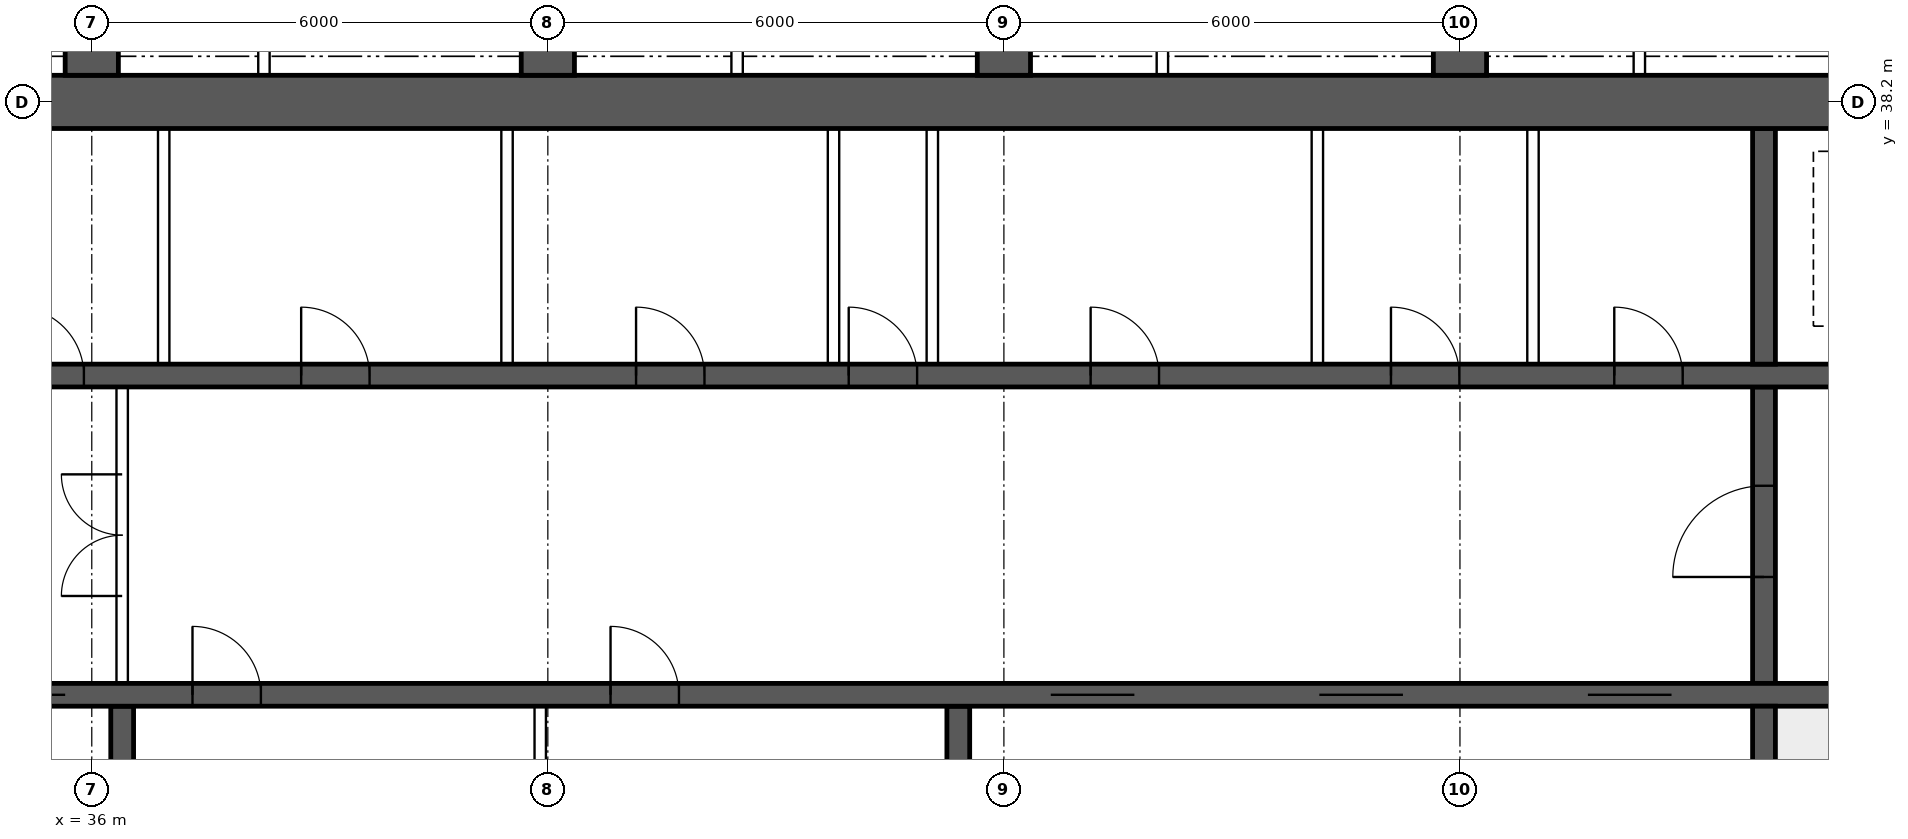
"""IFC4 building model, lengths in metres.
Left out: names, types, materials, properties, quantities, classifications, styles, units other than length and angle.
Written with IfcOpenShell. Run it as: python <this file> out.ifc"""

import sys

from ifc_helpers import new_model, si_unit, direction, frame, frame_2d, origin, place, context, subcontext, project, spatial, rectangle, extrude, element, fill, save


model = new_model("IFC4")
c1 = context("Model", 3, precision=1e-05, world=origin(), true_north=direction((0.0, 1.0)))
c2 = subcontext(c1, "Body", "Model", "MODEL_VIEW")
j1 = project(units=[si_unit("LENGTHUNIT", "METRE"), si_unit("PLANEANGLEUNIT", "RADIAN")], contexts=[c1])
p1 = place(None, origin())
s1 = spatial("IfcSite", under=j1, at=p1, CompositionType="ELEMENT")
p2 = place(p1, origin())
s2 = spatial("IfcBuilding", under=s1, at=p2, CompositionType="ELEMENT")
p3 = place(p2, frame((0.0, 0.0, 239.05)))
s3 = spatial("IfcBuildingStorey", under=s2, at=p3, CompositionType="ELEMENT", Elevation=239.05)
p4 = place(p3, frame((18.0, 38.2, 0.0), z_axis=(0.0, 0.0, 1.0), x_axis=(1.0, 0.0, 0.0)))
e1 = element("IfcWall", 1, at=p4, inside=s3, PredefinedType="SHEAR", context=c2, shape_type="SweptSolid", body=[
    extrude(rectangle(XDim=48.0, YDim=0.7, at=frame_2d((24.0, 0.0))), origin(), (0.0, 0.0, 1.0), 3.75),
])
p5 = place(p3, frame((18.35, 30.4, 0.0), z_axis=(0.0, 0.0, 1.0), x_axis=(1.0, 0.0, 0.0)))
e2 = element("IfcWall", 2, at=p5, inside=s3, PredefinedType="SHEAR", context=c2, shape_type="SweptSolid", body=[
    extrude(rectangle(XDim=47.3, YDim=0.3, at=frame_2d((23.65, 0.0))), origin(), (0.0, 0.0, 1.0), 3.75),
])
p6 = place(p5, frame((0.4, 0.0, 0.0)))
e3 = element("IfcOpeningElement", 3, at=p6, cuts=e2, PredefinedType="OPENING", context=c2, shape_type="SweptSolid", body=[
    extrude(rectangle(XDim=1.0, YDim=2.1, at=frame_2d((0.5, 1.05))), frame((0.0, 0.16, 0.0), z_axis=(0.0, -1.0, 0.0), x_axis=(1.0, 0.0, 0.0)), (0.0, 0.0, 1.0), 0.32),
])
p7 = place(p5, frame((45.9, 0.0, 0.0)))
e4 = element("IfcOpeningElement", 4, at=p7, cuts=e2, PredefinedType="OPENING", context=c2, shape_type="SweptSolid", body=[
    extrude(rectangle(XDim=1.0, YDim=2.1, at=frame_2d((0.5, 1.05))), frame((0.0, 0.16, 0.0), z_axis=(0.0, -1.0, 0.0), x_axis=(1.0, 0.0, 0.0)), (0.0, 0.0, 1.0), 0.32),
])
p8 = place(p5, frame((8.4, 0.0, 0.0)))
e5 = element("IfcOpeningElement", 5, at=p8, cuts=e2, PredefinedType="OPENING", context=c2, shape_type="SweptSolid", body=[
    extrude(rectangle(XDim=1.1, YDim=2.1, at=frame_2d((0.55, 1.05))), frame((0.0, 0.16, 0.0), z_axis=(0.0, -1.0, 0.0), x_axis=(1.0, 0.0, 0.0)), (0.0, 0.0, 1.0), 0.32),
])
p9 = place(p5, frame((11.0, 0.0, 0.0)))
e6 = element("IfcOpeningElement", 6, at=p9, cuts=e2, PredefinedType="OPENING", context=c2, shape_type="SweptSolid", body=[
    extrude(rectangle(XDim=1.1, YDim=2.1, at=frame_2d((0.55, 1.05))), frame((0.0, 0.16, 0.0), z_axis=(0.0, -1.0, 0.0), x_axis=(1.0, 0.0, 0.0)), (0.0, 0.0, 1.0), 0.32),
])
p10 = place(p5, frame((13.6, 0.0, 0.0)))
e7 = element("IfcOpeningElement", 7, at=p10, cuts=e2, PredefinedType="OPENING", context=c2, shape_type="SweptSolid", body=[
    extrude(rectangle(XDim=1.1, YDim=2.1, at=frame_2d((0.55, 1.05))), frame((0.0, 0.16, 0.0), z_axis=(0.0, -1.0, 0.0), x_axis=(1.0, 0.0, 0.0)), (0.0, 0.0, 1.0), 0.32),
])
p11 = place(p5, frame((16.2, 0.0, 0.0)))
e8 = element("IfcOpeningElement", 8, at=p11, cuts=e2, PredefinedType="OPENING", context=c2, shape_type="SweptSolid", body=[
    extrude(rectangle(XDim=1.1, YDim=2.1, at=frame_2d((0.55, 1.05))), frame((0.0, 0.16, 0.0), z_axis=(0.0, -1.0, 0.0), x_axis=(1.0, 0.0, 0.0)), (0.0, 0.0, 1.0), 0.32),
])
p12 = place(p5, frame((18.975, 0.0, 0.0)))
e9 = element("IfcOpeningElement", 9, at=p12, cuts=e2, PredefinedType="OPENING", context=c2, shape_type="SweptSolid", body=[
    extrude(rectangle(XDim=0.9, YDim=2.1, at=frame_2d((0.45, 1.05))), frame((0.0, 0.16, 0.0), z_axis=(0.0, -1.0, 0.0), x_axis=(1.0, 0.0, 0.0)), (0.0, 0.0, 1.0), 0.32),
])
p13 = place(p5, frame((24.475, 0.0, 0.0)))
e10 = element("IfcOpeningElement", 10, at=p13, cuts=e2, PredefinedType="OPENING", context=c2, shape_type="SweptSolid", body=[
    extrude(rectangle(XDim=0.9, YDim=2.1, at=frame_2d((0.45, 1.05))), frame((0.0, 0.16, 0.0), z_axis=(0.0, -1.0, 0.0), x_axis=(1.0, 0.0, 0.0)), (0.0, 0.0, 1.0), 0.32),
])
p14 = place(p5, frame((30.267, 0.0, 0.0)))
e11 = element("IfcOpeningElement", 11, at=p14, cuts=e2, PredefinedType="OPENING", context=c2, shape_type="SweptSolid", body=[
    extrude(rectangle(XDim=1.1, YDim=2.1, at=frame_2d((0.55, 1.05))), frame((0.0, 0.16, 0.0), z_axis=(0.0, -1.0, 0.0), x_axis=(1.0, 0.0, 0.0)), (0.0, 0.0, 1.0), 0.32),
])
p15 = place(p5, frame((33.8, 0.0, 0.0)))
e12 = element("IfcOpeningElement", 12, at=p15, cuts=e2, PredefinedType="OPENING", context=c2, shape_type="SweptSolid", body=[
    extrude(rectangle(XDim=1.1, YDim=2.1, at=frame_2d((0.55, 1.05))), frame((0.0, 0.16, 0.0), z_axis=(0.0, -1.0, 0.0), x_axis=(1.0, 0.0, 0.0)), (0.0, 0.0, 1.0), 0.32),
])
p16 = place(p5, frame((37.333, 0.0, 0.0)))
e13 = element("IfcOpeningElement", 13, at=p16, cuts=e2, PredefinedType="OPENING", context=c2, shape_type="SweptSolid", body=[
    extrude(rectangle(XDim=1.1, YDim=2.1, at=frame_2d((0.55, 1.05))), frame((0.0, 0.16, 0.0), z_axis=(0.0, -1.0, 0.0), x_axis=(1.0, 0.0, 0.0)), (0.0, 0.0, 1.0), 0.32),
])
p17 = place(p3, frame((18.35, 34.6, 0.0), z_axis=(0.0, 0.0, 1.0), x_axis=(1.0, 0.0, 0.0)))
e14 = element("IfcWall", 14, at=p17, inside=s3, PredefinedType="SHEAR", context=c2, shape_type="SweptSolid", body=[
    extrude(rectangle(XDim=47.3, YDim=0.3, at=frame_2d((23.65, 0.0))), origin(), (0.0, 0.0, 1.0), 3.75),
])
p18 = place(p17, frame((0.9, 0.0, 0.0)))
e15 = element("IfcOpeningElement", 15, at=p18, cuts=e14, PredefinedType="OPENING", context=c2, shape_type="SweptSolid", body=[
    extrude(rectangle(XDim=1.1, YDim=2.1, at=frame_2d((0.55, 1.05))), frame((0.0, 0.16, 0.0), z_axis=(0.0, -1.0, 0.0), x_axis=(1.0, 0.0, 0.0)), (0.0, 0.0, 1.0), 0.32),
])
p19 = place(p17, frame((45.3, 0.0, 0.0)))
e16 = element("IfcOpeningElement", 16, at=p19, cuts=e14, PredefinedType="OPENING", context=c2, shape_type="SweptSolid", body=[
    extrude(rectangle(XDim=1.1, YDim=2.1, at=frame_2d((0.55, 1.05))), frame((0.0, 0.16, 0.0), z_axis=(0.0, -1.0, 0.0), x_axis=(1.0, 0.0, 0.0)), (0.0, 0.0, 1.0), 0.32),
])
p20 = place(p17, frame((4.25, 0.0, 0.0)))
e17 = element("IfcOpeningElement", 17, at=p20, cuts=e14, PredefinedType="OPENING", context=c2, shape_type="SweptSolid", body=[
    extrude(rectangle(XDim=0.9, YDim=2.1, at=frame_2d((0.45, 1.05))), frame((0.0, 0.16, 0.0), z_axis=(0.0, -1.0, 0.0), x_axis=(1.0, 0.0, 0.0)), (0.0, 0.0, 1.0), 0.32),
])
p21 = place(p17, frame((42.15, 0.0, 0.0)))
e18 = element("IfcOpeningElement", 18, at=p21, cuts=e14, PredefinedType="OPENING", context=c2, shape_type="SweptSolid", body=[
    extrude(rectangle(XDim=0.9, YDim=2.1, at=frame_2d((0.45, 1.05))), frame((0.0, 0.16, 0.0), z_axis=(0.0, -1.0, 0.0), x_axis=(1.0, 0.0, 0.0)), (0.0, 0.0, 1.0), 0.32),
])
p22 = place(p17, frame((9.025, 0.0, 0.0)))
e19 = element("IfcOpeningElement", 19, at=p22, cuts=e14, PredefinedType="OPENING", context=c2, shape_type="SweptSolid", body=[
    extrude(rectangle(XDim=0.9, YDim=2.1, at=frame_2d((0.45, 1.05))), frame((0.0, 0.16, 0.0), z_axis=(0.0, -1.0, 0.0), x_axis=(1.0, 0.0, 0.0)), (0.0, 0.0, 1.0), 0.32),
])
p23 = place(p17, frame((12.999, 0.0, 0.0)))
e20 = element("IfcOpeningElement", 20, at=p23, cuts=e14, PredefinedType="OPENING", context=c2, shape_type="SweptSolid", body=[
    extrude(rectangle(XDim=0.9, YDim=2.1, at=frame_2d((0.45, 1.05))), frame((0.0, 0.16, 0.0), z_axis=(0.0, -1.0, 0.0), x_axis=(1.0, 0.0, 0.0)), (0.0, 0.0, 1.0), 0.32),
])
p24 = place(p17, frame((16.646, 0.0, 0.0)))
e21 = element("IfcOpeningElement", 21, at=p24, cuts=e14, PredefinedType="OPENING", context=c2, shape_type="SweptSolid", body=[
    extrude(rectangle(XDim=0.9, YDim=2.1, at=frame_2d((0.45, 1.05))), frame((0.0, 0.16, 0.0), z_axis=(0.0, -1.0, 0.0), x_axis=(1.0, 0.0, 0.0)), (0.0, 0.0, 1.0), 0.32),
])
p25 = place(p17, frame((20.405, 0.0, 0.0)))
e22 = element("IfcOpeningElement", 22, at=p25, cuts=e14, PredefinedType="OPENING", context=c2, shape_type="SweptSolid", body=[
    extrude(rectangle(XDim=0.9, YDim=2.1, at=frame_2d((0.45, 1.05))), frame((0.0, 0.16, 0.0), z_axis=(0.0, -1.0, 0.0), x_axis=(1.0, 0.0, 0.0)), (0.0, 0.0, 1.0), 0.32),
])
p26 = place(p17, frame((24.811, 0.0, 0.0)))
e23 = element("IfcOpeningElement", 23, at=p26, cuts=e14, PredefinedType="OPENING", context=c2, shape_type="SweptSolid", body=[
    extrude(rectangle(XDim=0.9, YDim=2.1, at=frame_2d((0.45, 1.05))), frame((0.0, 0.16, 0.0), z_axis=(0.0, -1.0, 0.0), x_axis=(1.0, 0.0, 0.0)), (0.0, 0.0, 1.0), 0.32),
])
p27 = place(p17, frame((27.608, 0.0, 0.0)))
e24 = element("IfcOpeningElement", 24, at=p27, cuts=e14, PredefinedType="OPENING", context=c2, shape_type="SweptSolid", body=[
    extrude(rectangle(XDim=0.9, YDim=2.1, at=frame_2d((0.45, 1.05))), frame((0.0, 0.16, 0.0), z_axis=(0.0, -1.0, 0.0), x_axis=(1.0, 0.0, 0.0)), (0.0, 0.0, 1.0), 0.32),
])
p28 = place(p17, frame((30.791, 0.0, 0.0)))
e25 = element("IfcOpeningElement", 25, at=p28, cuts=e14, PredefinedType="OPENING", context=c2, shape_type="SweptSolid", body=[
    extrude(rectangle(XDim=0.9, YDim=2.1, at=frame_2d((0.45, 1.05))), frame((0.0, 0.16, 0.0), z_axis=(0.0, -1.0, 0.0), x_axis=(1.0, 0.0, 0.0)), (0.0, 0.0, 1.0), 0.32),
])
p29 = place(p17, frame((34.742, 0.0, 0.0)))
e26 = element("IfcOpeningElement", 26, at=p29, cuts=e14, PredefinedType="OPENING", context=c2, shape_type="SweptSolid", body=[
    extrude(rectangle(XDim=0.9, YDim=2.1, at=frame_2d((0.45, 1.05))), frame((0.0, 0.16, 0.0), z_axis=(0.0, -1.0, 0.0), x_axis=(1.0, 0.0, 0.0)), (0.0, 0.0, 1.0), 0.32),
])
p30 = place(p17, frame((37.68, 0.0, 0.0)))
e27 = element("IfcOpeningElement", 27, at=p30, cuts=e14, PredefinedType="OPENING", context=c2, shape_type="SweptSolid", body=[
    extrude(rectangle(XDim=0.9, YDim=2.1, at=frame_2d((0.45, 1.05))), frame((0.0, 0.16, 0.0), z_axis=(0.0, -1.0, 0.0), x_axis=(1.0, 0.0, 0.0)), (0.0, 0.0, 1.0), 0.32),
])
p31 = place(p3, frame((58.0, 26.15, 0.0), z_axis=(0.0, 0.0, 1.0), x_axis=(0.0, 1.0, 0.0)))
e28 = element("IfcWall", 28, at=p31, inside=s3, PredefinedType="SHEAR", context=c2, shape_type="SweptSolid", body=[
    extrude(rectangle(XDim=4.1, YDim=0.3, at=frame_2d((2.05, 0.0))), origin(), (0.0, 0.0, 1.0), 3.75),
])
p32 = place(p3, frame((58.0, 30.55, 0.0), z_axis=(0.0, 0.0, 1.0), x_axis=(0.0, 1.0, 0.0)))
e29 = element("IfcWall", 29, at=p32, inside=s3, PredefinedType="SHEAR", context=c2, shape_type="SweptSolid", body=[
    extrude(rectangle(XDim=3.9, YDim=0.3, at=frame_2d((1.95, 0.0))), origin(), (0.0, 0.0, 1.0), 3.75),
])
p33 = place(p32, frame((1.4, 0.0, 0.0)))
e30 = element("IfcOpeningElement", 30, at=p33, cuts=e29, PredefinedType="OPENING", context=c2, shape_type="SweptSolid", body=[
    extrude(rectangle(XDim=1.2, YDim=2.1, at=frame_2d((0.6, 1.05))), frame((0.0, 0.16, 0.0), z_axis=(0.0, -1.0, 0.0), x_axis=(1.0, 0.0, 0.0)), (0.0, 0.0, 1.0), 0.32),
])
p34 = place(p3, frame((58.0, 34.75, 0.0), z_axis=(0.0, 0.0, 1.0), x_axis=(0.0, 1.0, 0.0)))
e31 = element("IfcWall", 31, at=p34, inside=s3, PredefinedType="SHEAR", context=c2, shape_type="SweptSolid", body=[
    extrude(rectangle(XDim=3.1, YDim=0.3, at=frame_2d((1.55, 0.0))), origin(), (0.0, 0.0, 1.0), 3.75),
])
for number, where, z_axis, x_axis in (
    (32, (36.4, 26.15, 0.0), (0.0, 0.0, 1.0), (0.0, 1.0, 0.0)),
    (33, (47.4, 26.15, 0.0), (0.0, 0.0, 1.0), (0.0, 1.0, 0.0)),
):
    element("IfcWall", number, at=place(p3, frame(where, z_axis=z_axis, x_axis=x_axis)), inside=s3, PredefinedType="SHEAR", context=c2, shape_type="SweptSolid", body=[
        extrude(rectangle(XDim=4.1, YDim=0.3, at=frame_2d((2.05, 0.0))), origin(), (0.0, 0.0, 1.0), 3.75),
    ])
for number, where, z_axis, x_axis in (
    (34, (36.0, 38.55, 0.0), (0.0, 0.0, 1.0), (0.0, 1.0, 0.0)),
    (35, (42.0, 38.55, 0.0), (0.0, 0.0, 1.0), (0.0, 1.0, 0.0)),
    (36, (48.0, 38.55, 0.0), (0.0, 0.0, 1.0), (0.0, 1.0, 0.0)),
    (37, (54.0, 38.55, 0.0), (0.0, 0.0, 1.0), (0.0, 1.0, 0.0)),
):
    element("IfcWall", number, at=place(p3, frame(where, z_axis=z_axis, x_axis=x_axis)), inside=s3, PredefinedType="SHEAR", context=c2, shape_type="SweptSolid", body=[
        extrude(rectangle(XDim=7.05, YDim=0.7, at=frame_2d((3.525, 0.0))), origin(), (0.0, 0.0, 1.0), 3.75),
    ])
p35 = place(p3, frame((36.4, 30.55, 0.0), z_axis=(0.0, 0.0, 1.0), x_axis=(0.0, 1.0, 0.0)))
e38 = element("IfcWall", 38, at=p35, inside=s3, PredefinedType="SOLIDWALL", context=c2, shape_type="SweptSolid", body=[
    extrude(rectangle(XDim=3.9, YDim=0.15, at=frame_2d((1.95, 0.0))), origin(), (0.0, 0.0, 1.0), 3.5),
])
p36 = place(p35, frame((1.15, 0.0, 0.0)))
e39 = element("IfcOpeningElement", 39, at=p36, cuts=e38, PredefinedType="OPENING", context=c2, shape_type="SweptSolid", body=[
    extrude(rectangle(XDim=1.6, YDim=2.1, at=frame_2d((0.8, 1.05))), frame((0.0, 0.085, 0.0), z_axis=(0.0, -1.0, 0.0), x_axis=(1.0, 0.0, 0.0)), (0.0, 0.0, 1.0), 0.17),
])
for number, where, z_axis, x_axis in (
    (40, (36.946, 34.75, 0.0), (0.0, 0.0, 1.0), (0.0, 1.0, 0.0)),
    (41, (41.463, 34.75, 0.0), (0.0, 0.0, 1.0), (0.0, 1.0, 0.0)),
    (42, (45.758, 34.75, 0.0), (0.0, 0.0, 1.0), (0.0, 1.0, 0.0)),
    (43, (47.058, 34.75, 0.0), (0.0, 0.0, 1.0), (0.0, 1.0, 0.0)),
    (44, (52.124, 34.75, 0.0), (0.0, 0.0, 1.0), (0.0, 1.0, 0.0)),
    (45, (54.961, 34.75, 0.0), (0.0, 0.0, 1.0), (0.0, 1.0, 0.0)),
):
    element("IfcWall", number, at=place(p3, frame(where, z_axis=z_axis, x_axis=x_axis)), inside=s3, PredefinedType="SOLIDWALL", context=c2, shape_type="SweptSolid", body=[
        extrude(rectangle(XDim=3.1, YDim=0.15, at=frame_2d((1.55, 0.0))), origin(), (0.0, 0.0, 1.0), 3.5),
    ])
p37 = place(p3, frame((41.9, 26.15, 0.0), z_axis=(0.0, 0.0, 1.0), x_axis=(0.0, 1.0, 0.0)))
e46 = element("IfcWall", 46, at=p37, inside=s3, PredefinedType="SOLIDWALL", context=c2, shape_type="SweptSolid", body=[
    extrude(rectangle(XDim=4.1, YDim=0.15, at=frame_2d((2.05, 0.0))), origin(), (0.0, 0.0, 1.0), 3.5),
])
for number, where, z_axis, x_axis in (
    (47, (38.265, 38.55, 0.0), (0.0, 0.0, 1.0), (0.0, 1.0, 0.0)),
    (48, (44.49, 38.55, 0.0), (0.0, 0.0, 1.0), (0.0, 1.0, 0.0)),
    (49, (50.085, 38.55, 0.0), (0.0, 0.0, 1.0), (0.0, 1.0, 0.0)),
    (50, (56.36, 38.55, 0.0), (0.0, 0.0, 1.0), (0.0, 1.0, 0.0)),
):
    element("IfcWall", number, at=place(p3, frame(where, z_axis=z_axis, x_axis=x_axis)), inside=s3, PredefinedType="PARTITIONING", context=c2, shape_type="SweptSolid", body=[
        extrude(rectangle(XDim=6.95, YDim=0.15, at=frame_2d((3.475, 0.0))), origin(), (0.0, 0.0, 1.0), 3.5),
    ])
p38 = place(p36, origin())
e51 = element("IfcDoor", 51, at=p38, inside=s3, OperationType="DOUBLE_DOOR_SINGLE_SWING", PredefinedType="DOOR", context=c2, shape_type="SweptSolid", body=[
    extrude(rectangle(XDim=1.6, YDim=2.1, at=frame_2d((0.8, 1.05))), frame((0.0, 0.025, 0.0), z_axis=(0.0, -1.0, 0.0), x_axis=(1.0, 0.0, 0.0)), (0.0, 0.0, 1.0), 0.05),
])
fill(e39, e51)
p39 = place(p33, origin())
e52 = element("IfcDoor", 52, at=p39, inside=s3, OperationType="SINGLE_SWING_LEFT", PredefinedType="DOOR", context=c2, shape_type="SweptSolid", body=[
    extrude(rectangle(XDim=1.2, YDim=2.1, at=frame_2d((0.6, 1.05))), frame((0.0, 0.025, 0.0), z_axis=(0.0, -1.0, 0.0), x_axis=(1.0, 0.0, 0.0)), (0.0, 0.0, 1.0), 0.05),
])
fill(e30, e52)
p40 = place(p24, origin())
e53 = element("IfcDoor", 53, at=p40, inside=s3, OperationType="SINGLE_SWING_LEFT", PredefinedType="DOOR", context=c2, shape_type="SweptSolid", body=[
    extrude(rectangle(XDim=0.9, YDim=2.1, at=frame_2d((0.45, 1.05))), frame((0.0, 0.025, 0.0), z_axis=(0.0, -1.0, 0.0), x_axis=(1.0, 0.0, 0.0)), (0.0, 0.0, 1.0), 0.05),
])
fill(e21, e53)
p41 = place(p25, origin())
e54 = element("IfcDoor", 54, at=p41, inside=s3, OperationType="SINGLE_SWING_LEFT", PredefinedType="DOOR", context=c2, shape_type="SweptSolid", body=[
    extrude(rectangle(XDim=0.9, YDim=2.1, at=frame_2d((0.45, 1.05))), frame((0.0, 0.025, 0.0), z_axis=(0.0, -1.0, 0.0), x_axis=(1.0, 0.0, 0.0)), (0.0, 0.0, 1.0), 0.05),
])
fill(e22, e54)
p42 = place(p26, origin())
e55 = element("IfcDoor", 55, at=p42, inside=s3, OperationType="SINGLE_SWING_LEFT", PredefinedType="DOOR", context=c2, shape_type="SweptSolid", body=[
    extrude(rectangle(XDim=0.9, YDim=2.1, at=frame_2d((0.45, 1.05))), frame((0.0, 0.025, 0.0), z_axis=(0.0, -1.0, 0.0), x_axis=(1.0, 0.0, 0.0)), (0.0, 0.0, 1.0), 0.05),
])
fill(e23, e55)
p43 = place(p27, origin())
e56 = element("IfcDoor", 56, at=p43, inside=s3, OperationType="SINGLE_SWING_LEFT", PredefinedType="DOOR", context=c2, shape_type="SweptSolid", body=[
    extrude(rectangle(XDim=0.9, YDim=2.1, at=frame_2d((0.45, 1.05))), frame((0.0, 0.025, 0.0), z_axis=(0.0, -1.0, 0.0), x_axis=(1.0, 0.0, 0.0)), (0.0, 0.0, 1.0), 0.05),
])
fill(e24, e56)
p44 = place(p28, origin())
e57 = element("IfcDoor", 57, at=p44, inside=s3, OperationType="SINGLE_SWING_LEFT", PredefinedType="DOOR", context=c2, shape_type="SweptSolid", body=[
    extrude(rectangle(XDim=0.9, YDim=2.1, at=frame_2d((0.45, 1.05))), frame((0.0, 0.025, 0.0), z_axis=(0.0, -1.0, 0.0), x_axis=(1.0, 0.0, 0.0)), (0.0, 0.0, 1.0), 0.05),
])
fill(e25, e57)
p45 = place(p29, origin())
e58 = element("IfcDoor", 58, at=p45, inside=s3, OperationType="SINGLE_SWING_LEFT", PredefinedType="DOOR", context=c2, shape_type="SweptSolid", body=[
    extrude(rectangle(XDim=0.9, YDim=2.1, at=frame_2d((0.45, 1.05))), frame((0.0, 0.025, 0.0), z_axis=(0.0, -1.0, 0.0), x_axis=(1.0, 0.0, 0.0)), (0.0, 0.0, 1.0), 0.05),
])
fill(e26, e58)
p46 = place(p30, origin())
e59 = element("IfcDoor", 59, at=p46, inside=s3, OperationType="SINGLE_SWING_LEFT", PredefinedType="DOOR", context=c2, shape_type="SweptSolid", body=[
    extrude(rectangle(XDim=0.9, YDim=2.1, at=frame_2d((0.45, 1.05))), frame((0.0, 0.025, 0.0), z_axis=(0.0, -1.0, 0.0), x_axis=(1.0, 0.0, 0.0)), (0.0, 0.0, 1.0), 0.05),
])
fill(e27, e59)
p47 = place(p11, origin())
e60 = element("IfcDoor", 60, at=p47, inside=s3, OperationType="DOUBLE_DOOR_SLIDING", PredefinedType="DOOR", context=c2, shape_type="SweptSolid", body=[
    extrude(rectangle(XDim=1.1, YDim=2.1, at=frame_2d((0.55, 1.05))), frame((0.0, 0.025, 0.0), z_axis=(0.0, -1.0, 0.0), x_axis=(1.0, 0.0, 0.0)), (0.0, 0.0, 1.0), 0.05),
])
fill(e8, e60)
p48 = place(p12, origin())
e61 = element("IfcDoor", 61, at=p48, inside=s3, OperationType="SINGLE_SWING_LEFT", PredefinedType="DOOR", context=c2, shape_type="SweptSolid", body=[
    extrude(rectangle(XDim=0.9, YDim=2.1, at=frame_2d((0.45, 1.05))), frame((0.0, 0.025, 0.0), z_axis=(0.0, -1.0, 0.0), x_axis=(1.0, 0.0, 0.0)), (0.0, 0.0, 1.0), 0.05),
])
fill(e9, e61)
p49 = place(p13, origin())
e62 = element("IfcDoor", 62, at=p49, inside=s3, OperationType="SINGLE_SWING_LEFT", PredefinedType="DOOR", context=c2, shape_type="SweptSolid", body=[
    extrude(rectangle(XDim=0.9, YDim=2.1, at=frame_2d((0.45, 1.05))), frame((0.0, 0.025, 0.0), z_axis=(0.0, -1.0, 0.0), x_axis=(1.0, 0.0, 0.0)), (0.0, 0.0, 1.0), 0.05),
])
fill(e10, e62)
p50 = place(p14, origin())
e63 = element("IfcDoor", 63, at=p50, inside=s3, OperationType="DOUBLE_DOOR_SLIDING", PredefinedType="DOOR", context=c2, shape_type="SweptSolid", body=[
    extrude(rectangle(XDim=1.1, YDim=2.1, at=frame_2d((0.55, 1.05))), frame((0.0, 0.025, 0.0), z_axis=(0.0, -1.0, 0.0), x_axis=(1.0, 0.0, 0.0)), (0.0, 0.0, 1.0), 0.05),
])
fill(e11, e63)
p51 = place(p15, origin())
e64 = element("IfcDoor", 64, at=p51, inside=s3, OperationType="DOUBLE_DOOR_SLIDING", PredefinedType="DOOR", context=c2, shape_type="SweptSolid", body=[
    extrude(rectangle(XDim=1.1, YDim=2.1, at=frame_2d((0.55, 1.05))), frame((0.0, 0.025, 0.0), z_axis=(0.0, -1.0, 0.0), x_axis=(1.0, 0.0, 0.0)), (0.0, 0.0, 1.0), 0.05),
])
fill(e12, e64)
p52 = place(p16, origin())
e65 = element("IfcDoor", 65, at=p52, inside=s3, OperationType="DOUBLE_DOOR_SLIDING", PredefinedType="DOOR", context=c2, shape_type="SweptSolid", body=[
    extrude(rectangle(XDim=1.1, YDim=2.1, at=frame_2d((0.55, 1.05))), frame((0.0, 0.025, 0.0), z_axis=(0.0, -1.0, 0.0), x_axis=(1.0, 0.0, 0.0)), (0.0, 0.0, 1.0), 0.05),
])
fill(e13, e65)
save(model, sys.argv[1])
